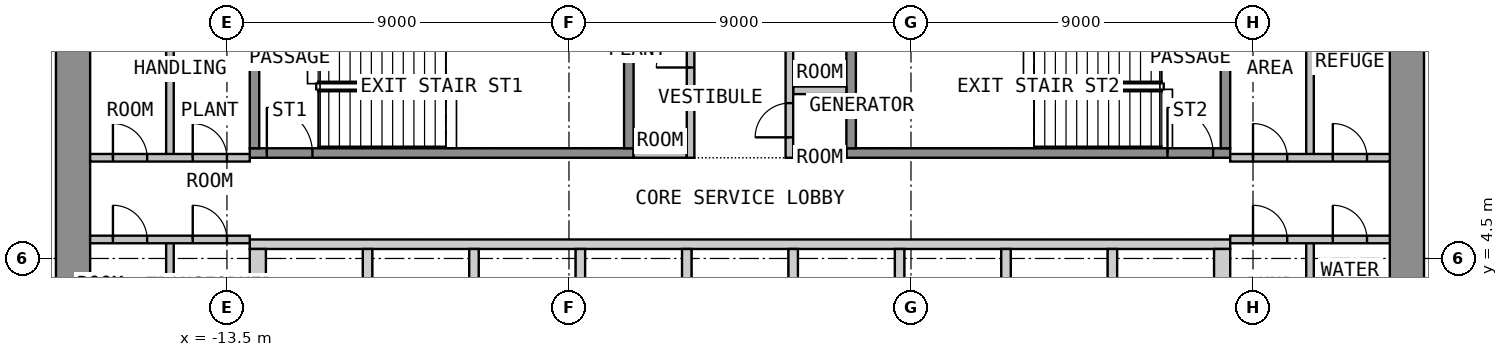
"""IFC4 building model, lengths in metres.
Left out: names, types, materials, properties, quantities, classifications, styles, units other than length and angle.
Written with IfcOpenShell. Run it as: python <this file> out.ifc"""

import sys

from ifc_helpers import new_model, si_unit, direction, frame, frame_2d, origin, place, context, subcontext, project, spatial, polyline, rectangle, outline, extrude, element, fill, save


model = new_model("IFC4")
c1 = context("Model", 3, precision=1e-05, world=origin(), true_north=direction((0.0, 1.0)))
c2 = subcontext(c1, "Body", "Model", "MODEL_VIEW")
j1 = project(units=[si_unit("LENGTHUNIT", "METRE"), si_unit("PLANEANGLEUNIT", "RADIAN")], contexts=[c1])
p1 = place(None, origin())
s1 = spatial("IfcSite", under=j1, at=p1, CompositionType="ELEMENT")
p2 = place(p1, origin())
s2 = spatial("IfcBuilding", under=s1, at=p2, CompositionType="ELEMENT")
p3 = place(p2, frame((0.0, 0.0, 76.8)))
s3 = spatial("IfcBuildingStorey", under=s2, at=p3, CompositionType="ELEMENT", Elevation=76.8)
p4 = place(p3, frame((-17.55, -12.6, 0.0), z_axis=(0.0, 0.0, 1.0), x_axis=(0.0, 1.0, 0.0)))
e1 = element("IfcWall", 1, at=p4, inside=s3, PredefinedType="SHEAR", context=c2, shape_type="SweptSolid", body=[
    extrude(rectangle(XDim=25.2, YDim=0.9, at=frame_2d((12.6, 0.0))), origin(), (0.0, 0.0, 1.0), 4.125),
])
p5 = place(p4, frame((11.4, 0.0, 0.0)))
e2 = element("IfcOpeningElement", 2, at=p5, cuts=e1, PredefinedType="OPENING", context=c2, shape_type="SweptSolid", body=[
    extrude(rectangle(XDim=2.4, YDim=2.1, at=frame_2d((1.2, 1.05))), frame((0.0, 0.46, 0.0), z_axis=(0.0, -1.0, 0.0), x_axis=(1.0, 0.0, 0.0)), (0.0, 0.0, 1.0), 0.92),
])
p6 = place(p3, frame((17.55, -12.6, 0.0), z_axis=(0.0, 0.0, 1.0), x_axis=(0.0, 1.0, 0.0)))
e3 = element("IfcWall", 3, at=p6, inside=s3, PredefinedType="SHEAR", context=c2, shape_type="SweptSolid", body=[
    extrude(rectangle(XDim=25.2, YDim=0.9, at=frame_2d((12.6, 0.0))), origin(), (0.0, 0.0, 1.0), 4.125),
])
p7 = place(p6, frame((11.4, 0.0, 0.0)))
e4 = element("IfcOpeningElement", 4, at=p7, cuts=e3, PredefinedType="OPENING", context=c2, shape_type="SweptSolid", body=[
    extrude(rectangle(XDim=2.4, YDim=2.1, at=frame_2d((1.2, 1.05))), frame((0.0, 0.46, 0.0), z_axis=(0.0, -1.0, 0.0), x_axis=(1.0, 0.0, 0.0)), (0.0, 0.0, 1.0), 0.92),
])
p8 = place(p3, origin())
e5 = element("IfcWall", 5, at=p8, inside=s3, PredefinedType="SHEAR", context=c2, shape_type="SweptSolid", body=[
    extrude(outline(polyline([(-12.9, 4.75), (12.9, 4.75), (12.9, 5.0), (-12.9, 5.0), (-12.9, 4.75)])), origin(), (0.0, 0.0, 1.0), 4.125),
])
p9 = place(p3, origin())
e6 = element("IfcWall", 6, at=p9, inside=s3, PredefinedType="SHEAR", context=c2, shape_type="SweptSolid", body=[
    extrude(outline(polyline([(-12.9, 2.05), (-12.475, 2.05), (-12.475, 4.75), (-12.9, 4.75), (-12.9, 2.05)])), origin(), (0.0, 0.0, 1.0), 4.125),
])
p10 = place(p3, origin())
e7 = element("IfcWall", 7, at=p10, inside=s3, PredefinedType="SHEAR", context=c2, shape_type="SweptSolid", body=[
    extrude(outline(polyline([(-9.925, 2.05), (-9.675, 2.05), (-9.675, 4.75), (-9.925, 4.75), (-9.925, 2.05)])), origin(), (0.0, 0.0, 1.0), 4.125),
])
p11 = place(p3, origin())
e8 = element("IfcWall", 8, at=p11, inside=s3, PredefinedType="SHEAR", context=c2, shape_type="SweptSolid", body=[
    extrude(outline(polyline([(-7.125, 2.05), (-6.875, 2.05), (-6.875, 4.75), (-7.125, 4.75), (-7.125, 2.05)])), origin(), (0.0, 0.0, 1.0), 4.125),
])
p12 = place(p3, origin())
e9 = element("IfcWall", 9, at=p12, inside=s3, PredefinedType="SHEAR", context=c2, shape_type="SweptSolid", body=[
    extrude(outline(polyline([(-4.325, 2.05), (-4.075, 2.05), (-4.075, 4.75), (-4.325, 4.75), (-4.325, 2.05)])), origin(), (0.0, 0.0, 1.0), 4.125),
])
p13 = place(p3, origin())
e10 = element("IfcWall", 10, at=p13, inside=s3, PredefinedType="SHEAR", context=c2, shape_type="SweptSolid", body=[
    extrude(outline(polyline([(-1.525, 2.05), (-1.275, 2.05), (-1.275, 4.75), (-1.525, 4.75), (-1.525, 2.05)])), origin(), (0.0, 0.0, 1.0), 4.125),
])
p14 = place(p3, origin())
e11 = element("IfcWall", 11, at=p14, inside=s3, PredefinedType="SHEAR", context=c2, shape_type="SweptSolid", body=[
    extrude(outline(polyline([(1.275, 2.05), (1.525, 2.05), (1.525, 4.75), (1.275, 4.75), (1.275, 2.05)])), origin(), (0.0, 0.0, 1.0), 4.125),
])
p15 = place(p3, origin())
e12 = element("IfcWall", 12, at=p15, inside=s3, PredefinedType="SHEAR", context=c2, shape_type="SweptSolid", body=[
    extrude(outline(polyline([(4.075, 2.05), (4.325, 2.05), (4.325, 4.75), (4.075, 4.75), (4.075, 2.05)])), origin(), (0.0, 0.0, 1.0), 4.125),
])
p16 = place(p3, origin())
e13 = element("IfcWall", 13, at=p16, inside=s3, PredefinedType="SHEAR", context=c2, shape_type="SweptSolid", body=[
    extrude(outline(polyline([(6.875, 2.05), (7.125, 2.05), (7.125, 4.75), (6.875, 4.75), (6.875, 2.05)])), origin(), (0.0, 0.0, 1.0), 4.125),
])
p17 = place(p3, origin())
e14 = element("IfcWall", 14, at=p17, inside=s3, PredefinedType="SHEAR", context=c2, shape_type="SweptSolid", body=[
    extrude(outline(polyline([(9.675, 2.05), (9.925, 2.05), (9.925, 4.75), (9.675, 4.75), (9.675, 2.05)])), origin(), (0.0, 0.0, 1.0), 4.125),
])
p18 = place(p3, origin())
e15 = element("IfcWall", 15, at=p18, inside=s3, PredefinedType="SHEAR", context=c2, shape_type="SweptSolid", body=[
    extrude(outline(polyline([(12.475, 2.05), (12.9, 2.05), (12.9, 4.75), (12.475, 4.75), (12.475, 2.05)])), origin(), (0.0, 0.0, 1.0), 4.125),
])
p19 = place(p3, frame((-12.9, 7.275, 0.0), z_axis=(0.0, 0.0, 1.0), x_axis=(1.0, 0.0, 0.0)))
e16 = element("IfcWall", 16, at=p19, inside=s3, PredefinedType="SHEAR", context=c2, shape_type="SweptSolid", body=[
    extrude(rectangle(XDim=10.1, YDim=0.25, at=frame_2d((5.05, 0.0))), origin(), (0.0, 0.0, 1.0), 4.125),
])
p20 = place(p19, frame((0.45, 0.0, 0.0)))
e17 = element("IfcOpeningElement", 17, at=p20, cuts=e16, PredefinedType="OPENING", context=c2, shape_type="SweptSolid", body=[
    extrude(rectangle(XDim=1.2, YDim=2.1, at=frame_2d((0.6, 1.05))), frame((0.0, 0.135, 0.0), z_axis=(0.0, -1.0, 0.0), x_axis=(1.0, 0.0, 0.0)), (0.0, 0.0, 1.0), 0.27),
])
for number, where, z_axis, x_axis in (
    (18, (-12.775, 7.4, 0.0), (0.0, 0.0, 1.0), (0.0, 1.0, 0.0)),
    (19, (-2.925, 7.4, 0.0), (0.0, 0.0, 1.0), (0.0, 1.0, 0.0)),
):
    element("IfcWall", number, at=place(p3, frame(where, z_axis=z_axis, x_axis=x_axis)), inside=s3, PredefinedType="SHEAR", context=c2, shape_type="SweptSolid", body=[
        extrude(rectangle(XDim=3.25, YDim=0.25, at=frame_2d((1.625, 0.0))), origin(), (0.0, 0.0, 1.0), 4.125),
    ])
p21 = place(p3, frame((2.8, 7.275, 0.0), z_axis=(0.0, 0.0, 1.0), x_axis=(1.0, 0.0, 0.0)))
e20 = element("IfcWall", 20, at=p21, inside=s3, PredefinedType="SHEAR", context=c2, shape_type="SweptSolid", body=[
    extrude(rectangle(XDim=10.1, YDim=0.25, at=frame_2d((5.05, 0.0))), origin(), (0.0, 0.0, 1.0), 4.125),
])
p22 = place(p21, frame((8.45, 0.0, 0.0)))
e21 = element("IfcOpeningElement", 21, at=p22, cuts=e20, PredefinedType="OPENING", context=c2, shape_type="SweptSolid", body=[
    extrude(rectangle(XDim=1.2, YDim=2.1, at=frame_2d((0.6, 1.05))), frame((0.0, 0.135, 0.0), z_axis=(0.0, -1.0, 0.0), x_axis=(1.0, 0.0, 0.0)), (0.0, 0.0, 1.0), 0.27),
])
for number, where, z_axis, x_axis in (
    (22, (2.925, 7.4, 0.0), (0.0, 0.0, 1.0), (0.0, 1.0, 0.0)),
    (23, (12.775, 7.4, 0.0), (0.0, 0.0, 1.0), (0.0, 1.0, 0.0)),
):
    element("IfcWall", number, at=place(p3, frame(where, z_axis=z_axis, x_axis=x_axis)), inside=s3, PredefinedType="SHEAR", context=c2, shape_type="SweptSolid", body=[
        extrude(rectangle(XDim=3.25, YDim=0.25, at=frame_2d((1.625, 0.0))), origin(), (0.0, 0.0, 1.0), 4.125),
    ])
for number, where, z_axis, x_axis in (
    (24, (-2.8, 7.25, 0.0), (0.0, 0.0, 1.0), (1.0, 0.0, 0.0)),
    (25, (1.4, 7.25, 0.0), (0.0, 0.0, 1.0), (1.0, 0.0, 0.0)),
    (26, (1.4, 8.925, 0.0), (0.0, 0.0, 1.0), (1.0, 0.0, 0.0)),
):
    element("IfcWall", number, at=place(p3, frame(where, z_axis=z_axis, x_axis=x_axis)), inside=s3, PredefinedType="PARTITIONING", context=c2, shape_type="SweptSolid", body=[
        extrude(rectangle(XDim=1.4, YDim=0.2, at=frame_2d((0.7, 0.0))), origin(), (0.0, 0.0, 1.0), 4.125),
    ])
p23 = place(p3, frame((-1.3, 7.15, 0.0), z_axis=(0.0, 0.0, 1.0), x_axis=(0.0, 1.0, 0.0)))
e27 = element("IfcWall", 27, at=p23, inside=s3, PredefinedType="PARTITIONING", context=c2, shape_type="SweptSolid", body=[
    extrude(rectangle(XDim=5.45, YDim=0.2, at=frame_2d((2.725, 0.0))), origin(), (0.0, 0.0, 1.0), 4.125),
])
p24 = place(p23, frame((2.375, 0.0, 0.0)))
e28 = element("IfcOpeningElement", 28, at=p24, cuts=e27, PredefinedType="OPENING", context=c2, shape_type="SweptSolid", body=[
    extrude(rectangle(XDim=0.9, YDim=2.1, at=frame_2d((0.45, 1.05))), frame((0.0, 0.11, 0.0), z_axis=(0.0, -1.0, 0.0), x_axis=(1.0, 0.0, 0.0)), (0.0, 0.0, 1.0), 0.22),
])
p25 = place(p3, frame((1.3, 7.15, 0.0), z_axis=(0.0, 0.0, 1.0), x_axis=(0.0, 1.0, 0.0)))
e29 = element("IfcWall", 29, at=p25, inside=s3, PredefinedType="PARTITIONING", context=c2, shape_type="SweptSolid", body=[
    extrude(rectangle(XDim=5.45, YDim=0.2, at=frame_2d((2.725, 0.0))), origin(), (0.0, 0.0, 1.0), 4.125),
])
p26 = place(p25, frame((0.538, 0.0, 0.0)))
e30 = element("IfcOpeningElement", 30, at=p26, cuts=e29, PredefinedType="OPENING", context=c2, shape_type="SweptSolid", body=[
    extrude(rectangle(XDim=0.9, YDim=2.1, at=frame_2d((0.45, 1.05))), frame((0.0, 0.11, 0.0), z_axis=(0.0, -1.0, 0.0), x_axis=(1.0, 0.0, 0.0)), (0.0, 0.0, 1.0), 0.22),
])
p27 = place(p25, frame((3.163, 0.0, 0.0)))
e31 = element("IfcOpeningElement", 31, at=p27, cuts=e29, PredefinedType="OPENING", context=c2, shape_type="SweptSolid", body=[
    extrude(rectangle(XDim=0.9, YDim=2.1, at=frame_2d((0.45, 1.05))), frame((0.0, 0.11, 0.0), z_axis=(0.0, -1.0, 0.0), x_axis=(1.0, 0.0, 0.0)), (0.0, 0.0, 1.0), 0.22),
])
p28 = place(p3, frame((-15.0, 7.15, 0.0), z_axis=(0.0, 0.0, 1.0), x_axis=(0.0, 1.0, 0.0)))
e32 = element("IfcWall", 32, at=p28, inside=s3, PredefinedType="PARTITIONING", context=c2, shape_type="SweptSolid", body=[
    extrude(rectangle(XDim=5.45, YDim=0.2, at=frame_2d((2.725, 0.0))), origin(), (0.0, 0.0, 1.0), 4.125),
])
p29 = place(p3, frame((-17.1, 7.15, 0.0), z_axis=(0.0, 0.0, 1.0), x_axis=(1.0, 0.0, 0.0)))
e33 = element("IfcWall", 33, at=p29, inside=s3, PredefinedType="PARTITIONING", context=c2, shape_type="SweptSolid", body=[
    extrude(rectangle(XDim=4.2, YDim=0.2, at=frame_2d((2.1, 0.0))), origin(), (0.0, 0.0, 1.0), 4.125),
])
p30 = place(p29, frame((0.6, 0.0, 0.0)))
e34 = element("IfcOpeningElement", 34, at=p30, cuts=e33, PredefinedType="OPENING", context=c2, shape_type="SweptSolid", body=[
    extrude(rectangle(XDim=0.9, YDim=2.1, at=frame_2d((0.45, 1.05))), frame((0.0, 0.11, 0.0), z_axis=(0.0, -1.0, 0.0), x_axis=(1.0, 0.0, 0.0)), (0.0, 0.0, 1.0), 0.22),
])
p31 = place(p29, frame((2.7, 0.0, 0.0)))
e35 = element("IfcOpeningElement", 35, at=p31, cuts=e33, PredefinedType="OPENING", context=c2, shape_type="SweptSolid", body=[
    extrude(rectangle(XDim=0.9, YDim=2.1, at=frame_2d((0.45, 1.05))), frame((0.0, 0.11, 0.0), z_axis=(0.0, -1.0, 0.0), x_axis=(1.0, 0.0, 0.0)), (0.0, 0.0, 1.0), 0.22),
])
p32 = place(p3, frame((-15.0, 1.8, 0.0), z_axis=(0.0, 0.0, 1.0), x_axis=(0.0, 1.0, 0.0)))
e36 = element("IfcWall", 36, at=p32, inside=s3, PredefinedType="PARTITIONING", context=c2, shape_type="SweptSolid", body=[
    extrude(rectangle(XDim=3.2, YDim=0.2, at=frame_2d((1.6, 0.0))), origin(), (0.0, 0.0, 1.0), 4.125),
])
p33 = place(p3, frame((-17.1, 5.0, 0.0), z_axis=(0.0, 0.0, 1.0), x_axis=(1.0, 0.0, 0.0)))
e37 = element("IfcWall", 37, at=p33, inside=s3, PredefinedType="PARTITIONING", context=c2, shape_type="SweptSolid", body=[
    extrude(rectangle(XDim=4.2, YDim=0.2, at=frame_2d((2.1, 0.0))), origin(), (0.0, 0.0, 1.0), 4.125),
])
p34 = place(p33, frame((0.6, 0.0, 0.0)))
e38 = element("IfcOpeningElement", 38, at=p34, cuts=e37, PredefinedType="OPENING", context=c2, shape_type="SweptSolid", body=[
    extrude(rectangle(XDim=0.9, YDim=2.1, at=frame_2d((0.45, 1.05))), frame((0.0, 0.11, 0.0), z_axis=(0.0, -1.0, 0.0), x_axis=(1.0, 0.0, 0.0)), (0.0, 0.0, 1.0), 0.22),
])
p35 = place(p33, frame((2.7, 0.0, 0.0)))
e39 = element("IfcOpeningElement", 39, at=p35, cuts=e37, PredefinedType="OPENING", context=c2, shape_type="SweptSolid", body=[
    extrude(rectangle(XDim=0.9, YDim=2.1, at=frame_2d((0.45, 1.05))), frame((0.0, 0.11, 0.0), z_axis=(0.0, -1.0, 0.0), x_axis=(1.0, 0.0, 0.0)), (0.0, 0.0, 1.0), 0.22),
])
p36 = place(p3, frame((15.0, 7.15, 0.0), z_axis=(0.0, 0.0, 1.0), x_axis=(0.0, 1.0, 0.0)))
e40 = element("IfcWall", 40, at=p36, inside=s3, PredefinedType="PARTITIONING", context=c2, shape_type="SweptSolid", body=[
    extrude(rectangle(XDim=5.45, YDim=0.2, at=frame_2d((2.725, 0.0))), origin(), (0.0, 0.0, 1.0), 4.125),
])
p37 = place(p3, frame((12.9, 7.15, 0.0), z_axis=(0.0, 0.0, 1.0), x_axis=(1.0, 0.0, 0.0)))
e41 = element("IfcWall", 41, at=p37, inside=s3, PredefinedType="PARTITIONING", context=c2, shape_type="SweptSolid", body=[
    extrude(rectangle(XDim=4.2, YDim=0.2, at=frame_2d((2.1, 0.0))), origin(), (0.0, 0.0, 1.0), 4.125),
])
p38 = place(p37, frame((0.6, 0.0, 0.0)))
e42 = element("IfcOpeningElement", 42, at=p38, cuts=e41, PredefinedType="OPENING", context=c2, shape_type="SweptSolid", body=[
    extrude(rectangle(XDim=0.9, YDim=2.1, at=frame_2d((0.45, 1.05))), frame((0.0, 0.11, 0.0), z_axis=(0.0, -1.0, 0.0), x_axis=(1.0, 0.0, 0.0)), (0.0, 0.0, 1.0), 0.22),
])
p39 = place(p37, frame((2.7, 0.0, 0.0)))
e43 = element("IfcOpeningElement", 43, at=p39, cuts=e41, PredefinedType="OPENING", context=c2, shape_type="SweptSolid", body=[
    extrude(rectangle(XDim=0.9, YDim=2.1, at=frame_2d((0.45, 1.05))), frame((0.0, 0.11, 0.0), z_axis=(0.0, -1.0, 0.0), x_axis=(1.0, 0.0, 0.0)), (0.0, 0.0, 1.0), 0.22),
])
p40 = place(p3, frame((15.0, 1.8, 0.0), z_axis=(0.0, 0.0, 1.0), x_axis=(0.0, 1.0, 0.0)))
e44 = element("IfcWall", 44, at=p40, inside=s3, PredefinedType="PARTITIONING", context=c2, shape_type="SweptSolid", body=[
    extrude(rectangle(XDim=3.2, YDim=0.2, at=frame_2d((1.6, 0.0))), origin(), (0.0, 0.0, 1.0), 4.125),
])
p41 = place(p3, frame((12.9, 5.0, 0.0), z_axis=(0.0, 0.0, 1.0), x_axis=(1.0, 0.0, 0.0)))
e45 = element("IfcWall", 45, at=p41, inside=s3, PredefinedType="PARTITIONING", context=c2, shape_type="SweptSolid", body=[
    extrude(rectangle(XDim=4.2, YDim=0.2, at=frame_2d((2.1, 0.0))), origin(), (0.0, 0.0, 1.0), 4.125),
])
p42 = place(p41, frame((0.6, 0.0, 0.0)))
e46 = element("IfcOpeningElement", 46, at=p42, cuts=e45, PredefinedType="OPENING", context=c2, shape_type="SweptSolid", body=[
    extrude(rectangle(XDim=0.9, YDim=2.1, at=frame_2d((0.45, 1.05))), frame((0.0, 0.11, 0.0), z_axis=(0.0, -1.0, 0.0), x_axis=(1.0, 0.0, 0.0)), (0.0, 0.0, 1.0), 0.22),
])
p43 = place(p41, frame((2.7, 0.0, 0.0)))
e47 = element("IfcOpeningElement", 47, at=p43, cuts=e45, PredefinedType="OPENING", context=c2, shape_type="SweptSolid", body=[
    extrude(rectangle(XDim=0.9, YDim=2.1, at=frame_2d((0.45, 1.05))), frame((0.0, 0.11, 0.0), z_axis=(0.0, -1.0, 0.0), x_axis=(1.0, 0.0, 0.0)), (0.0, 0.0, 1.0), 0.22),
])
p44 = place(p20, origin())
e48 = element("IfcDoor", 48, at=p44, inside=s3, OperationType="SINGLE_SWING_LEFT", PredefinedType="DOOR", context=c2, shape_type="SweptSolid", body=[
    extrude(rectangle(XDim=1.2, YDim=2.1, at=frame_2d((0.6, 1.05))), frame((0.0, 0.025, 0.0), z_axis=(0.0, -1.0, 0.0), x_axis=(1.0, 0.0, 0.0)), (0.0, 0.0, 1.0), 0.05),
])
fill(e17, e48)
p45 = place(p22, origin())
e49 = element("IfcDoor", 49, at=p45, inside=s3, OperationType="SINGLE_SWING_LEFT", PredefinedType="DOOR", context=c2, shape_type="SweptSolid", body=[
    extrude(rectangle(XDim=1.2, YDim=2.1, at=frame_2d((0.6, 1.05))), frame((0.0, 0.025, 0.0), z_axis=(0.0, -1.0, 0.0), x_axis=(1.0, 0.0, 0.0)), (0.0, 0.0, 1.0), 0.05),
])
fill(e21, e49)
p46 = place(p24, origin())
e50 = element("IfcDoor", 50, at=p46, inside=s3, OperationType="SINGLE_SWING_LEFT", PredefinedType="DOOR", context=c2, shape_type="SweptSolid", body=[
    extrude(rectangle(XDim=0.9, YDim=2.1, at=frame_2d((0.45, 1.05))), frame((0.0, 0.025, 0.0), z_axis=(0.0, -1.0, 0.0), x_axis=(1.0, 0.0, 0.0)), (0.0, 0.0, 1.0), 0.05),
])
fill(e28, e50)
p47 = place(p26, origin())
e51 = element("IfcDoor", 51, at=p47, inside=s3, OperationType="SINGLE_SWING_LEFT", PredefinedType="DOOR", context=c2, shape_type="SweptSolid", body=[
    extrude(rectangle(XDim=0.9, YDim=2.1, at=frame_2d((0.45, 1.05))), frame((0.0, 0.025, 0.0), z_axis=(0.0, -1.0, 0.0), x_axis=(1.0, 0.0, 0.0)), (0.0, 0.0, 1.0), 0.05),
])
fill(e30, e51)
p48 = place(p30, origin())
e52 = element("IfcDoor", 52, at=p48, inside=s3, OperationType="SINGLE_SWING_LEFT", PredefinedType="DOOR", context=c2, shape_type="SweptSolid", body=[
    extrude(rectangle(XDim=0.9, YDim=2.1, at=frame_2d((0.45, 1.05))), frame((0.0, 0.025, 0.0), z_axis=(0.0, -1.0, 0.0), x_axis=(1.0, 0.0, 0.0)), (0.0, 0.0, 1.0), 0.05),
])
fill(e34, e52)
p49 = place(p31, origin())
e53 = element("IfcDoor", 53, at=p49, inside=s3, OperationType="SINGLE_SWING_LEFT", PredefinedType="DOOR", context=c2, shape_type="SweptSolid", body=[
    extrude(rectangle(XDim=0.9, YDim=2.1, at=frame_2d((0.45, 1.05))), frame((0.0, 0.025, 0.0), z_axis=(0.0, -1.0, 0.0), x_axis=(1.0, 0.0, 0.0)), (0.0, 0.0, 1.0), 0.05),
])
fill(e35, e53)
p50 = place(p34, origin())
e54 = element("IfcDoor", 54, at=p50, inside=s3, OperationType="SINGLE_SWING_LEFT", PredefinedType="DOOR", context=c2, shape_type="SweptSolid", body=[
    extrude(rectangle(XDim=0.9, YDim=2.1, at=frame_2d((0.45, 1.05))), frame((0.0, 0.025, 0.0), z_axis=(0.0, -1.0, 0.0), x_axis=(1.0, 0.0, 0.0)), (0.0, 0.0, 1.0), 0.05),
])
fill(e38, e54)
p51 = place(p35, origin())
e55 = element("IfcDoor", 55, at=p51, inside=s3, OperationType="SINGLE_SWING_LEFT", PredefinedType="DOOR", context=c2, shape_type="SweptSolid", body=[
    extrude(rectangle(XDim=0.9, YDim=2.1, at=frame_2d((0.45, 1.05))), frame((0.0, 0.025, 0.0), z_axis=(0.0, -1.0, 0.0), x_axis=(1.0, 0.0, 0.0)), (0.0, 0.0, 1.0), 0.05),
])
fill(e39, e55)
p52 = place(p38, origin())
e56 = element("IfcDoor", 56, at=p52, inside=s3, OperationType="SINGLE_SWING_LEFT", PredefinedType="DOOR", context=c2, shape_type="SweptSolid", body=[
    extrude(rectangle(XDim=0.9, YDim=2.1, at=frame_2d((0.45, 1.05))), frame((0.0, 0.025, 0.0), z_axis=(0.0, -1.0, 0.0), x_axis=(1.0, 0.0, 0.0)), (0.0, 0.0, 1.0), 0.05),
])
fill(e42, e56)
p53 = place(p39, origin())
e57 = element("IfcDoor", 57, at=p53, inside=s3, OperationType="SINGLE_SWING_LEFT", PredefinedType="DOOR", context=c2, shape_type="SweptSolid", body=[
    extrude(rectangle(XDim=0.9, YDim=2.1, at=frame_2d((0.45, 1.05))), frame((0.0, 0.025, 0.0), z_axis=(0.0, -1.0, 0.0), x_axis=(1.0, 0.0, 0.0)), (0.0, 0.0, 1.0), 0.05),
])
fill(e43, e57)
p54 = place(p42, origin())
e58 = element("IfcDoor", 58, at=p54, inside=s3, OperationType="SINGLE_SWING_LEFT", PredefinedType="DOOR", context=c2, shape_type="SweptSolid", body=[
    extrude(rectangle(XDim=0.9, YDim=2.1, at=frame_2d((0.45, 1.05))), frame((0.0, 0.025, 0.0), z_axis=(0.0, -1.0, 0.0), x_axis=(1.0, 0.0, 0.0)), (0.0, 0.0, 1.0), 0.05),
])
fill(e46, e58)
p55 = place(p43, origin())
e59 = element("IfcDoor", 59, at=p55, inside=s3, OperationType="SINGLE_SWING_LEFT", PredefinedType="DOOR", context=c2, shape_type="SweptSolid", body=[
    extrude(rectangle(XDim=0.9, YDim=2.1, at=frame_2d((0.45, 1.05))), frame((0.0, 0.025, 0.0), z_axis=(0.0, -1.0, 0.0), x_axis=(1.0, 0.0, 0.0)), (0.0, 0.0, 1.0), 0.05),
])
fill(e47, e59)
save(model, sys.argv[1])
